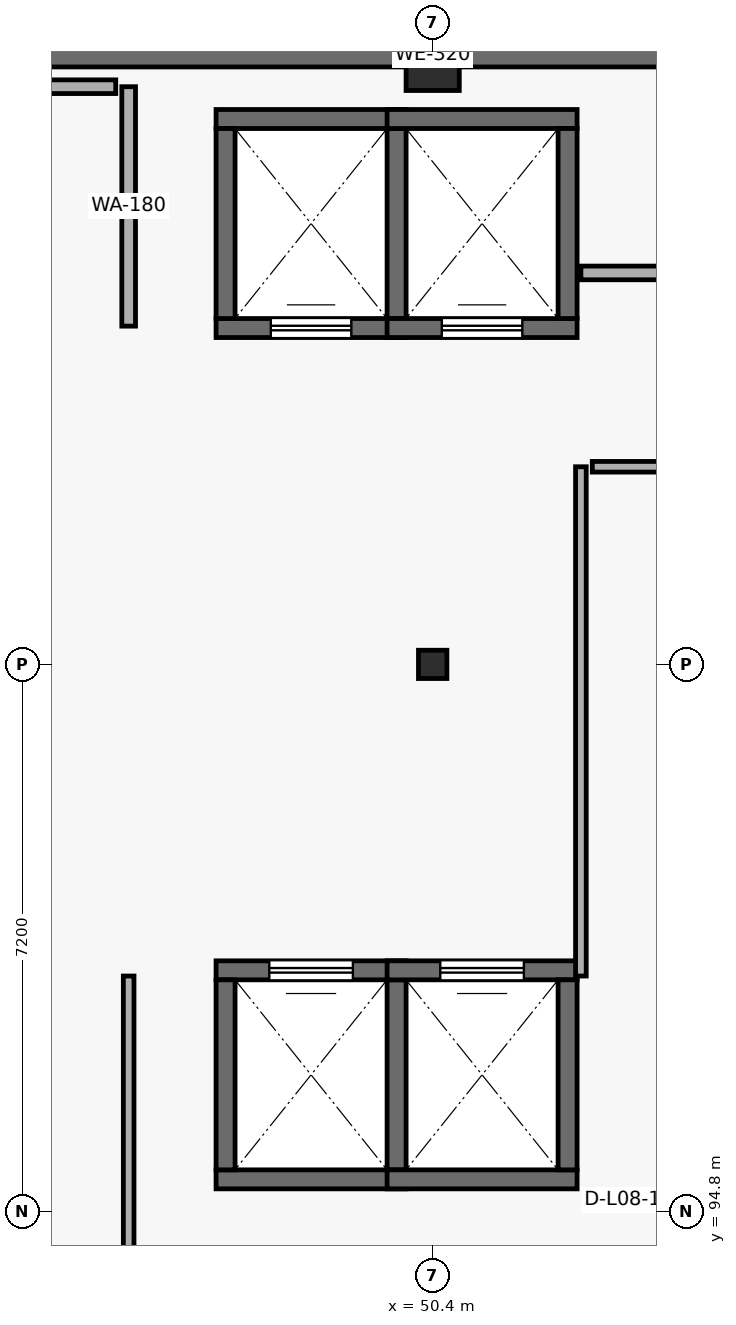
"""IFC4 building model, lengths in metres.
Left out: names, types, materials, properties, quantities, classifications, styles, units other than length and angle.
Written with IfcOpenShell. Run it as: python <this file> out.ifc"""

import sys

from ifc_helpers import new_model, si_unit, direction, frame, frame_2d, origin, origin_2d, place, context, subcontext, project, spatial, rectangle, i_section, extrude, element, fill, save


model = new_model("IFC4")
c1 = context("Model", 3, precision=1e-05, world=origin(), true_north=direction((0.0, 1.0)))
c2 = subcontext(c1, "Body", "Model", "MODEL_VIEW")
j1 = project(units=[si_unit("LENGTHUNIT", "METRE"), si_unit("PLANEANGLEUNIT", "RADIAN")], contexts=[c1])
p1 = place(None, origin())
s1 = spatial("IfcSite", under=j1, at=p1, CompositionType="ELEMENT")
p2 = place(p1, origin())
s2 = spatial("IfcBuilding", under=s1, at=p2, CompositionType="ELEMENT")
p3 = place(p2, frame((0.0, 0.0, 35.7)))
s3 = spatial("IfcBuildingStorey", under=s2, at=p3, CompositionType="ELEMENT", Elevation=35.7)
p4 = place(p3, frame((50.4, 102.0, 0.0), z_axis=(0.0, 0.0, 1.0), x_axis=(1.0, 0.0, 0.0)))
e1 = element("IfcColumn", 1, at=p4, inside=s3, PredefinedType="COLUMN", context=c2, shape_type="SweptSolid", body=[
    extrude(i_section(OverallWidth=0.374, OverallDepth=0.372, WebThickness=0.016, FlangeThickness=0.026, at=origin_2d()), origin(), (0.0, 0.0, 1.0), 4.5),
])
p5 = place(p3, frame((50.4, 109.9, 0.0), z_axis=(0.0, 0.0, 1.0), x_axis=(1.0, 0.0, 0.0)))
e2 = element("IfcColumn", 2, at=p5, inside=s3, PredefinedType="COLUMN", context=c2, shape_type="SweptSolid", body=[
    extrude(rectangle(XDim=0.7, YDim=0.7, at=origin_2d()), origin(), (0.0, 0.0, 1.0), 4.5),
])
p6 = place(p3, frame((33.6, 110.02, 0.0), z_axis=(0.0, 0.0, 1.0), x_axis=(1.0, 0.0, 0.0)))
e3 = element("IfcWall", 3, at=p6, inside=s3, PredefinedType="SOLIDWALL", context=c2, shape_type="SweptSolid", body=[
    extrude(rectangle(XDim=33.6, YDim=0.32, at=frame_2d((16.8, 0.0))), origin(), (0.0, 0.0, 1.0), 4.24),
])
p7 = place(p3, frame((47.55, 95.225, 0.0), z_axis=(0.0, 0.0, 1.0), x_axis=(1.0, 0.0, 0.0)))
e4 = element("IfcWall", 4, at=p7, inside=s3, PredefinedType="SHEAR", context=c2, shape_type="SweptSolid", body=[
    extrude(rectangle(XDim=2.5, YDim=0.25, at=frame_2d((1.25, 0.0))), origin(), (0.0, 0.0, 1.0), 4.24),
])
p8 = place(p3, frame((50.05, 97.975, 0.0), z_axis=(0.0, 0.0, 1.0), x_axis=(-1.0, 0.0, 0.0)))
e5 = element("IfcWall", 5, at=p8, inside=s3, PredefinedType="SHEAR", context=c2, shape_type="SweptSolid", body=[
    extrude(rectangle(XDim=2.5, YDim=0.25, at=frame_2d((1.25, 0.0))), origin(), (0.0, 0.0, 1.0), 4.24),
])
p9 = place(p8, frame((0.7, 0.0, 0.0)))
e6 = element("IfcOpeningElement", 6, at=p9, cuts=e5, PredefinedType="OPENING", context=c2, shape_type="SweptSolid", body=[
    extrude(rectangle(XDim=1.1, YDim=2.2, at=frame_2d((0.55, 1.1))), frame((0.0, 0.135, 0.0), z_axis=(0.0, -1.0, 0.0), x_axis=(1.0, 0.0, 0.0)), (0.0, 0.0, 1.0), 0.27),
])
for number, where, z_axis, x_axis in (
    (7, (47.675, 95.35, 0.0), (0.0, 0.0, 1.0), (0.0, 1.0, 0.0)),
    (8, (49.925, 97.85, 0.0), (0.0, 0.0, 1.0), (0.0, -1.0, 0.0)),
    (9, (49.8, 95.225, 0.0), (0.0, 0.0, 1.0), (1.0, 0.0, 0.0)),
):
    element("IfcWall", number, at=place(p3, frame(where, z_axis=z_axis, x_axis=x_axis)), inside=s3, PredefinedType="SHEAR", context=c2, shape_type="SweptSolid", body=[
        extrude(rectangle(XDim=2.5, YDim=0.25, at=frame_2d((1.25, 0.0))), origin(), (0.0, 0.0, 1.0), 4.24),
    ])
p10 = place(p3, frame((52.3, 97.975, 0.0), z_axis=(0.0, 0.0, 1.0), x_axis=(-1.0, 0.0, 0.0)))
e10 = element("IfcWall", 10, at=p10, inside=s3, PredefinedType="SHEAR", context=c2, shape_type="SweptSolid", body=[
    extrude(rectangle(XDim=2.5, YDim=0.25, at=frame_2d((1.25, 0.0))), origin(), (0.0, 0.0, 1.0), 4.24),
])
p11 = place(p10, frame((0.7, 0.0, 0.0)))
e11 = element("IfcOpeningElement", 11, at=p11, cuts=e10, PredefinedType="OPENING", context=c2, shape_type="SweptSolid", body=[
    extrude(rectangle(XDim=1.1, YDim=2.2, at=frame_2d((0.55, 1.1))), frame((0.0, 0.135, 0.0), z_axis=(0.0, -1.0, 0.0), x_axis=(1.0, 0.0, 0.0)), (0.0, 0.0, 1.0), 0.27),
])
p12 = place(p3, frame((52.175, 97.85, 0.0), z_axis=(0.0, 0.0, 1.0), x_axis=(0.0, -1.0, 0.0)))
e12 = element("IfcWall", 12, at=p12, inside=s3, PredefinedType="SHEAR", context=c2, shape_type="SweptSolid", body=[
    extrude(rectangle(XDim=2.5, YDim=0.25, at=frame_2d((1.25, 0.0))), origin(), (0.0, 0.0, 1.0), 4.24),
])
p13 = place(p3, frame((47.55, 106.425, 0.0), z_axis=(0.0, 0.0, 1.0), x_axis=(1.0, 0.0, 0.0)))
e13 = element("IfcWall", 13, at=p13, inside=s3, PredefinedType="SHEAR", context=c2, shape_type="SweptSolid", body=[
    extrude(rectangle(XDim=2.5, YDim=0.25, at=frame_2d((1.25, 0.0))), origin(), (0.0, 0.0, 1.0), 4.24),
])
p14 = place(p13, frame((0.72, 0.0, 0.0)))
e14 = element("IfcOpeningElement", 14, at=p14, cuts=e13, PredefinedType="OPENING", context=c2, shape_type="SweptSolid", body=[
    extrude(rectangle(XDim=1.06, YDim=2.2, at=frame_2d((0.53, 1.1))), frame((0.0, 0.135, 0.0), z_axis=(0.0, -1.0, 0.0), x_axis=(1.0, 0.0, 0.0)), (0.0, 0.0, 1.0), 0.27),
])
for number, where, z_axis, x_axis in (
    (15, (50.05, 109.175, 0.0), (0.0, 0.0, 1.0), (-1.0, 0.0, 0.0)),
    (16, (47.675, 106.55, 0.0), (0.0, 0.0, 1.0), (0.0, 1.0, 0.0)),
    (17, (49.925, 109.05, 0.0), (0.0, 0.0, 1.0), (0.0, -1.0, 0.0)),
):
    element("IfcWall", number, at=place(p3, frame(where, z_axis=z_axis, x_axis=x_axis)), inside=s3, PredefinedType="SHEAR", context=c2, shape_type="SweptSolid", body=[
        extrude(rectangle(XDim=2.5, YDim=0.25, at=frame_2d((1.25, 0.0))), origin(), (0.0, 0.0, 1.0), 4.24),
    ])
p15 = place(p3, frame((49.8, 106.425, 0.0), z_axis=(0.0, 0.0, 1.0), x_axis=(1.0, 0.0, 0.0)))
e18 = element("IfcWall", 18, at=p15, inside=s3, PredefinedType="SHEAR", context=c2, shape_type="SweptSolid", body=[
    extrude(rectangle(XDim=2.5, YDim=0.25, at=frame_2d((1.25, 0.0))), origin(), (0.0, 0.0, 1.0), 4.24),
])
p16 = place(p15, frame((0.72, 0.0, 0.0)))
e19 = element("IfcOpeningElement", 19, at=p16, cuts=e18, PredefinedType="OPENING", context=c2, shape_type="SweptSolid", body=[
    extrude(rectangle(XDim=1.06, YDim=2.2, at=frame_2d((0.53, 1.1))), frame((0.0, 0.135, 0.0), z_axis=(0.0, -1.0, 0.0), x_axis=(1.0, 0.0, 0.0)), (0.0, 0.0, 1.0), 0.27),
])
for number, where, z_axis, x_axis in (
    (20, (52.3, 109.175, 0.0), (0.0, 0.0, 1.0), (-1.0, 0.0, 0.0)),
    (21, (52.175, 109.05, 0.0), (0.0, 0.0, 1.0), (0.0, -1.0, 0.0)),
):
    element("IfcWall", number, at=place(p3, frame(where, z_axis=z_axis, x_axis=x_axis)), inside=s3, PredefinedType="SHEAR", context=c2, shape_type="SweptSolid", body=[
        extrude(rectangle(XDim=2.5, YDim=0.25, at=frame_2d((1.25, 0.0))), origin(), (0.0, 0.0, 1.0), 4.24),
    ])
p17 = place(p3, frame((63.11, 107.15, 0.0), z_axis=(0.0, 0.0, 1.0), x_axis=(-1.0, 0.0, 0.0)))
e22 = element("IfcWall", 22, at=p17, inside=s3, PredefinedType="PARTITIONING", context=c2, shape_type="SweptSolid", body=[
    extrude(rectangle(XDim=10.76, YDim=0.18, at=frame_2d((5.38, 0.0))), origin(), (0.0, 0.0, 1.0), 4.24),
])
p18 = place(p3, frame((52.35, 97.9, 0.0), z_axis=(0.0, 0.0, 1.0), x_axis=(0.0, 1.0, 0.0)))
e23 = element("IfcWall", 23, at=p18, inside=s3, PredefinedType="PARTITIONING", context=c2, shape_type="SweptSolid", body=[
    extrude(rectangle(XDim=6.7, YDim=0.14, at=frame_2d((3.35, 0.0))), origin(), (0.0, 0.0, 1.0), 4.24),
])
p19 = place(p3, frame((46.4, 94.0, 0.0), z_axis=(0.0, 0.0, 1.0), x_axis=(0.0, 1.0, 0.0)))
e24 = element("IfcWall", 24, at=p19, inside=s3, PredefinedType="PARTITIONING", context=c2, shape_type="SweptSolid", body=[
    extrude(rectangle(XDim=3.9, YDim=0.14, at=frame_2d((1.95, 0.0))), origin(), (0.0, 0.0, 1.0), 4.24),
])
p20 = place(p3, frame((46.4, 106.45, 0.0), z_axis=(0.0, 0.0, 1.0), x_axis=(0.0, 1.0, 0.0)))
e25 = element("IfcWall", 25, at=p20, inside=s3, PredefinedType="PARTITIONING", context=c2, shape_type="SweptSolid", body=[
    extrude(rectangle(XDim=3.15, YDim=0.18, at=frame_2d((1.575, 0.0))), origin(), (0.0, 0.0, 1.0), 4.24),
])
p21 = place(p3, frame((52.5, 104.6, 0.0), z_axis=(0.0, 0.0, 1.0), x_axis=(1.0, 0.0, 0.0)))
e26 = element("IfcWall", 26, at=p21, inside=s3, PredefinedType="PARTITIONING", context=c2, shape_type="SweptSolid", body=[
    extrude(rectangle(XDim=2.58, YDim=0.14, at=frame_2d((1.29, 0.0))), origin(), (0.0, 0.0, 1.0), 4.24),
])
p22 = place(p3, frame((46.23, 109.6, 0.0), z_axis=(0.0, 0.0, 1.0), x_axis=(-1.0, 0.0, 0.0)))
e27 = element("IfcWall", 27, at=p22, inside=s3, PredefinedType="PARTITIONING", context=c2, shape_type="SweptSolid", body=[
    extrude(rectangle(XDim=1.895, YDim=0.18, at=frame_2d((0.948, 0.0))), origin(), (0.0, 0.0, 1.0), 3.3),
])
p23 = place(p9, origin())
e28 = element("IfcDoor", 28, at=p23, inside=s3, OperationType="SLIDING_TO_LEFT", PredefinedType="DOOR", context=c2, shape_type="SweptSolid", body=[
    extrude(rectangle(XDim=1.1, YDim=2.2, at=frame_2d((0.55, 1.1))), frame((0.0, 0.025, 0.0), z_axis=(0.0, -1.0, 0.0), x_axis=(1.0, 0.0, 0.0)), (0.0, 0.0, 1.0), 0.05),
])
fill(e6, e28)
p24 = place(p11, origin())
e29 = element("IfcDoor", 29, at=p24, inside=s3, OperationType="SLIDING_TO_LEFT", PredefinedType="DOOR", context=c2, shape_type="SweptSolid", body=[
    extrude(rectangle(XDim=1.1, YDim=2.2, at=frame_2d((0.55, 1.1))), frame((0.0, 0.025, 0.0), z_axis=(0.0, -1.0, 0.0), x_axis=(1.0, 0.0, 0.0)), (0.0, 0.0, 1.0), 0.05),
])
fill(e11, e29)
p25 = place(p14, origin())
e30 = element("IfcDoor", 30, at=p25, inside=s3, OperationType="SLIDING_TO_LEFT", PredefinedType="DOOR", context=c2, shape_type="SweptSolid", body=[
    extrude(rectangle(XDim=1.06, YDim=2.2, at=frame_2d((0.53, 1.1))), frame((0.0, 0.025, 0.0), z_axis=(0.0, -1.0, 0.0), x_axis=(1.0, 0.0, 0.0)), (0.0, 0.0, 1.0), 0.05),
])
fill(e14, e30)
p26 = place(p16, origin())
e31 = element("IfcDoor", 31, at=p26, inside=s3, OperationType="SLIDING_TO_LEFT", PredefinedType="DOOR", context=c2, shape_type="SweptSolid", body=[
    extrude(rectangle(XDim=1.06, YDim=2.2, at=frame_2d((0.53, 1.1))), frame((0.0, 0.025, 0.0), z_axis=(0.0, -1.0, 0.0), x_axis=(1.0, 0.0, 0.0)), (0.0, 0.0, 1.0), 0.05),
])
fill(e19, e31)
save(model, sys.argv[1])
